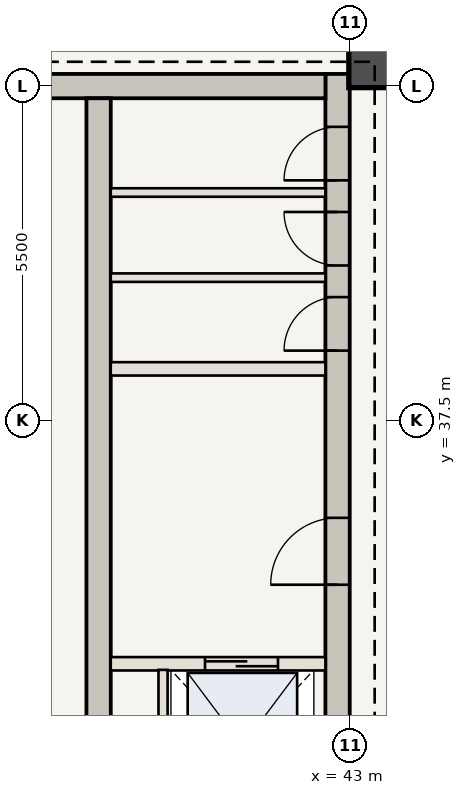
"""IFC4 building model, lengths in metres.
Left out: names, types, materials, properties, quantities, classifications, styles, units other than length and angle.
Written with IfcOpenShell. Run it as: python <this file> out.ifc"""

import sys

from ifc_helpers import new_model, si_unit, direction, frame, frame_2d, origin, origin_2d, place, context, subcontext, project, spatial, rectangle, extrude, element, fill, save


model = new_model("IFC4")
c1 = context("Model", 3, precision=1e-05, world=origin(), true_north=direction((0.0, 1.0)))
c2 = subcontext(c1, "Body", "Model", "MODEL_VIEW")
j1 = project(units=[si_unit("LENGTHUNIT", "METRE"), si_unit("PLANEANGLEUNIT", "RADIAN")], contexts=[c1])
p1 = place(None, origin())
s1 = spatial("IfcSite", under=j1, at=p1, CompositionType="ELEMENT")
p2 = place(p1, origin())
s2 = spatial("IfcBuilding", under=s1, at=p2, CompositionType="ELEMENT")
p3 = place(p2, frame((0.0, 0.0, 300.65)))
s3 = spatial("IfcBuildingStorey", under=s2, at=p3, CompositionType="ELEMENT", Elevation=300.65)
p4 = place(p3, frame((42.79, 30.6, 0.0), z_axis=(0.0, 0.0, 1.0), x_axis=(0.0, 1.0, 0.0)))
e1 = element("IfcWall", 1, at=p4, inside=s3, PredefinedType="SHEAR", context=c2, shape_type="SweptSolid", body=[
    extrude(rectangle(XDim=12.6, YDim=0.4, at=frame_2d((6.3, 0.0))), origin(), (0.0, 0.0, 1.0), 3.85),
])
p5 = place(p4, frame((4.2, 0.0, 0.0)))
e2 = element("IfcOpeningElement", 2, at=p5, cuts=e1, PredefinedType="OPENING", context=c2, shape_type="SweptSolid", body=[
    extrude(rectangle(XDim=1.1, YDim=2.15, at=frame_2d((0.55, 1.075))), frame((0.0, 0.21, 0.0), z_axis=(0.0, -1.0, 0.0), x_axis=(1.0, 0.0, 0.0)), (0.0, 0.0, 1.0), 0.42),
])
p6 = place(p4, frame((8.05, 0.0, 0.0)))
e3 = element("IfcOpeningElement", 3, at=p6, cuts=e1, PredefinedType="OPENING", context=c2, shape_type="SweptSolid", body=[
    extrude(rectangle(XDim=0.88, YDim=2.1, at=frame_2d((0.44, 1.05))), frame((0.0, 0.21, 0.0), z_axis=(0.0, -1.0, 0.0), x_axis=(1.0, 0.0, 0.0)), (0.0, 0.0, 1.0), 0.42),
])
p7 = place(p4, frame((9.45, 0.0, 0.0)))
e4 = element("IfcOpeningElement", 4, at=p7, cuts=e1, PredefinedType="OPENING", context=c2, shape_type="SweptSolid", body=[
    extrude(rectangle(XDim=0.88, YDim=2.1, at=frame_2d((0.44, 1.05))), frame((0.0, 0.21, 0.0), z_axis=(0.0, -1.0, 0.0), x_axis=(1.0, 0.0, 0.0)), (0.0, 0.0, 1.0), 0.42),
])
p8 = place(p4, frame((10.85, 0.0, 0.0)))
e5 = element("IfcOpeningElement", 5, at=p8, cuts=e1, PredefinedType="OPENING", context=c2, shape_type="SweptSolid", body=[
    extrude(rectangle(XDim=0.88, YDim=2.1, at=frame_2d((0.44, 1.05))), frame((0.0, 0.21, 0.0), z_axis=(0.0, -1.0, 0.0), x_axis=(1.0, 0.0, 0.0)), (0.0, 0.0, 1.0), 0.42),
])
p9 = place(p3, frame((37.75, 43.0, 0.0), z_axis=(0.0, 0.0, 1.0), x_axis=(1.0, 0.0, 0.0)))
e6 = element("IfcWall", 6, at=p9, inside=s3, PredefinedType="SHEAR", context=c2, shape_type="SweptSolid", body=[
    extrude(rectangle(XDim=4.84, YDim=0.4, at=frame_2d((2.42, 0.0))), origin(), (0.0, 0.0, 1.0), 3.85),
])
p10 = place(p3, frame((38.86, 30.6, 0.0), z_axis=(0.0, 0.0, 1.0), x_axis=(0.0, 1.0, 0.0)))
e7 = element("IfcWall", 7, at=p10, inside=s3, PredefinedType="SHEAR", context=c2, shape_type="SweptSolid", body=[
    extrude(rectangle(XDim=12.2, YDim=0.4, at=frame_2d((6.1, 0.0))), origin(), (0.0, 0.0, 1.0), 3.85),
])
p11 = place(p3, frame((43.35, 43.35, 0.0), z_axis=(0.0, 0.0, 1.0), x_axis=(1.0, 0.0, 0.0)))
e8 = element("IfcColumn", 8, at=p11, inside=s3, PredefinedType="COLUMN", context=c2, shape_type="SweptSolid", body=[
    extrude(rectangle(XDim=0.75, YDim=0.75, at=origin_2d()), origin(), (0.0, 0.0, 1.0), 3.85),
])
p12 = place(p3, frame((39.06, 33.5, 0.0), z_axis=(0.0, 0.0, 1.0), x_axis=(1.0, 0.0, 0.0)))
e9 = element("IfcWall", 9, at=p12, inside=s3, PredefinedType="STANDARD", context=c2, shape_type="SweptSolid", body=[
    extrude(rectangle(XDim=3.53, YDim=0.22, at=frame_2d((1.765, 0.0))), origin(), (0.0, 0.0, 1.0), 3.685),
])
p13 = place(p12, frame((1.55, 0.0, 0.0)))
e10 = element("IfcOpeningElement", 10, at=p13, cuts=e9, PredefinedType="OPENING", context=c2, shape_type="SweptSolid", body=[
    extrude(rectangle(XDim=1.2, YDim=2.2, at=frame_2d((0.6, 1.1))), frame((0.0, 0.12, 0.0), z_axis=(0.0, -1.0, 0.0), x_axis=(1.0, 0.0, 0.0)), (0.0, 0.0, 1.0), 0.24),
])
p14 = place(p3, frame((39.92, 30.75, 0.0), z_axis=(0.0, 0.0, 1.0), x_axis=(0.0, 1.0, 0.0)))
e11 = element("IfcWall", 11, at=p14, inside=s3, PredefinedType="STANDARD", context=c2, shape_type="SweptSolid", body=[
    extrude(rectangle(XDim=2.65, YDim=0.15, at=frame_2d((1.325, 0.0))), origin(), (0.0, 0.0, 1.0), 3.685),
])
p15 = place(p3, frame((39.06, 38.35, 0.0), z_axis=(0.0, 0.0, 1.0), x_axis=(1.0, 0.0, 0.0)))
e12 = element("IfcWall", 12, at=p15, inside=s3, PredefinedType="STANDARD", context=c2, shape_type="SweptSolid", body=[
    extrude(rectangle(XDim=3.53, YDim=0.22, at=frame_2d((1.765, 0.0))), origin(), (0.0, 0.0, 1.0), 3.685),
])
for number, where, z_axis, x_axis in (
    (13, (39.06, 39.85, 0.0), (0.0, 0.0, 1.0), (1.0, 0.0, 0.0)),
    (14, (39.06, 41.25, 0.0), (0.0, 0.0, 1.0), (1.0, 0.0, 0.0)),
):
    element("IfcWall", number, at=place(p3, frame(where, z_axis=z_axis, x_axis=x_axis)), inside=s3, PredefinedType="STANDARD", context=c2, shape_type="SweptSolid", body=[
        extrude(rectangle(XDim=3.53, YDim=0.14, at=frame_2d((1.765, 0.0))), origin(), (0.0, 0.0, 1.0), 3.685),
    ])
p16 = place(p5, origin())
e15 = element("IfcDoor", 15, at=p16, inside=s3, OperationType="SINGLE_SWING_LEFT", PredefinedType="DOOR", context=c2, shape_type="SweptSolid", body=[
    extrude(rectangle(XDim=1.1, YDim=2.15, at=frame_2d((0.55, 1.075))), frame((0.0, 0.025, 0.0), z_axis=(0.0, -1.0, 0.0), x_axis=(1.0, 0.0, 0.0)), (0.0, 0.0, 1.0), 0.05),
])
fill(e2, e15)
p17 = place(p6, origin())
e16 = element("IfcDoor", 16, at=p17, inside=s3, OperationType="SINGLE_SWING_LEFT", PredefinedType="DOOR", context=c2, shape_type="SweptSolid", body=[
    extrude(rectangle(XDim=0.88, YDim=2.1, at=frame_2d((0.44, 1.05))), frame((0.0, 0.025, 0.0), z_axis=(0.0, -1.0, 0.0), x_axis=(1.0, 0.0, 0.0)), (0.0, 0.0, 1.0), 0.05),
])
fill(e3, e16)
p18 = place(p7, origin())
e17 = element("IfcDoor", 17, at=p18, inside=s3, OperationType="SINGLE_SWING_RIGHT", PredefinedType="DOOR", context=c2, shape_type="SweptSolid", body=[
    extrude(rectangle(XDim=0.88, YDim=2.1, at=frame_2d((0.44, 1.05))), frame((0.0, 0.025, 0.0), z_axis=(0.0, -1.0, 0.0), x_axis=(1.0, 0.0, 0.0)), (0.0, 0.0, 1.0), 0.05),
])
fill(e4, e17)
p19 = place(p8, origin())
e18 = element("IfcDoor", 18, at=p19, inside=s3, OperationType="SINGLE_SWING_LEFT", PredefinedType="DOOR", context=c2, shape_type="SweptSolid", body=[
    extrude(rectangle(XDim=0.88, YDim=2.1, at=frame_2d((0.44, 1.05))), frame((0.0, 0.025, 0.0), z_axis=(0.0, -1.0, 0.0), x_axis=(1.0, 0.0, 0.0)), (0.0, 0.0, 1.0), 0.05),
])
fill(e5, e18)
p20 = place(p13, origin())
e19 = element("IfcDoor", 19, at=p20, inside=s3, OperationType="DOUBLE_DOOR_SLIDING", PredefinedType="DOOR", context=c2, shape_type="SweptSolid", body=[
    extrude(rectangle(XDim=1.2, YDim=2.2, at=frame_2d((0.6, 1.1))), frame((0.0, 0.025, 0.0), z_axis=(0.0, -1.0, 0.0), x_axis=(1.0, 0.0, 0.0)), (0.0, 0.0, 1.0), 0.05),
])
fill(e10, e19)
save(model, sys.argv[1])
